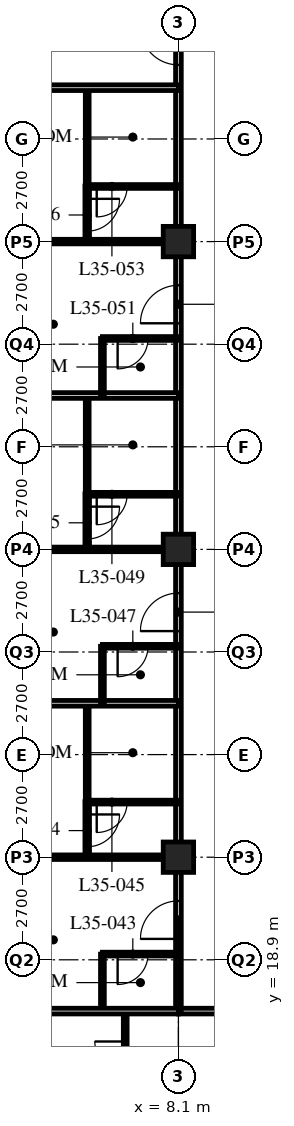
"""IFC4 building model, lengths in metres.
Left out: names, types, materials, properties, quantities, classifications, styles, units other than length and angle.
Written with IfcOpenShell. Run it as: python <this file> out.ifc"""

import sys

from ifc_helpers import new_model, si_unit, direction, frame, frame_2d, origin, origin_2d, place, context, subcontext, project, spatial, rectangle, hollow_rectangle, extrude, element, fill, save


model = new_model("IFC4")
c1 = context("Model", 3, precision=1e-05, world=origin(), true_north=direction((0.0, 1.0)))
c2 = subcontext(c1, "Body", "Model", "MODEL_VIEW")
j1 = project(units=[si_unit("LENGTHUNIT", "METRE"), si_unit("PLANEANGLEUNIT", "RADIAN")], contexts=[c1])
p1 = place(None, origin())
s1 = spatial("IfcSite", under=j1, at=p1, CompositionType="ELEMENT")
p2 = place(p1, origin())
s2 = spatial("IfcBuilding", under=s1, at=p2, CompositionType="ELEMENT")
p3 = place(p2, frame((0.0, 0.0, 137.4)))
s3 = spatial("IfcBuildingStorey", under=s2, at=p3, CompositionType="ELEMENT", Elevation=137.4)
for number, where, z_axis, x_axis in (
    (1, (8.1, 21.6, 0.0), (0.0, 0.0, 1.0), (1.0, 0.0, 0.0)),
    (2, (8.1, 29.7, 0.0), (0.0, 0.0, 1.0), (1.0, 0.0, 0.0)),
    (3, (8.1, 37.8, 0.0), (0.0, 0.0, 1.0), (1.0, 0.0, 0.0)),
):
    element("IfcColumn", number, at=place(p3, frame(where, z_axis=z_axis, x_axis=x_axis)), inside=s3, PredefinedType="COLUMN", context=c2, shape_type="SweptSolid", body=[
        extrude(hollow_rectangle(XDim=0.8, YDim=0.8, WallThickness=0.08, at=origin_2d()), origin(), (0.0, 0.0, 1.0), 3.4),
    ])
p4 = place(p3, frame((8.1, 17.55, 0.0), z_axis=(0.0, 0.0, 1.0), x_axis=(1.0, 0.0, 0.0)))
e4 = element("IfcWall", 4, at=p4, inside=s3, PredefinedType="PARTITIONING", context=c2, shape_type="SweptSolid", body=[
    extrude(rectangle(XDim=36.45, YDim=0.15, at=frame_2d((18.225, 0.0))), origin(), (0.0, 0.0, 1.0), 3.19),
])
p5 = place(p4, frame((9.625, 0.0, 0.0)))
e5 = element("IfcOpeningElement", 5, at=p5, cuts=e4, PredefinedType="OPENING", context=c2, shape_type="SweptSolid", body=[
    extrude(rectangle(XDim=1.0, YDim=2.1, at=frame_2d((0.5, 1.05))), frame((0.0, 0.085, 0.0), z_axis=(0.0, -1.0, 0.0), x_axis=(1.0, 0.0, 0.0)), (0.0, 0.0, 1.0), 0.17),
])
p6 = place(p4, frame((18.1, 0.0, 0.0)))
e6 = element("IfcOpeningElement", 6, at=p6, cuts=e4, PredefinedType="OPENING", context=c2, shape_type="SweptSolid", body=[
    extrude(rectangle(XDim=1.0, YDim=2.1, at=frame_2d((0.5, 1.05))), frame((0.0, 0.085, 0.0), z_axis=(0.0, -1.0, 0.0), x_axis=(1.0, 0.0, 0.0)), (0.0, 0.0, 1.0), 0.17),
])
p7 = place(p4, frame((26.75, 0.0, 0.0)))
e7 = element("IfcOpeningElement", 7, at=p7, cuts=e4, PredefinedType="OPENING", context=c2, shape_type="SweptSolid", body=[
    extrude(rectangle(XDim=1.0, YDim=2.1, at=frame_2d((0.5, 1.05))), frame((0.0, 0.085, 0.0), z_axis=(0.0, -1.0, 0.0), x_axis=(1.0, 0.0, 0.0)), (0.0, 0.0, 1.0), 0.17),
])
p8 = place(p4, frame((30.8, 0.0, 0.0)))
e8 = element("IfcOpeningElement", 8, at=p8, cuts=e4, PredefinedType="OPENING", context=c2, shape_type="SweptSolid", body=[
    extrude(rectangle(XDim=1.0, YDim=2.1, at=frame_2d((0.5, 1.05))), frame((0.0, 0.085, 0.0), z_axis=(0.0, -1.0, 0.0), x_axis=(1.0, 0.0, 0.0)), (0.0, 0.0, 1.0), 0.17),
])
p9 = place(p4, frame((1.525, 0.0, 0.0)))
e9 = element("IfcOpeningElement", 9, at=p9, cuts=e4, PredefinedType="OPENING", context=c2, shape_type="SweptSolid", body=[
    extrude(rectangle(XDim=1.0, YDim=2.1, at=frame_2d((0.5, 1.05))), frame((0.0, 0.085, 0.0), z_axis=(0.0, -1.0, 0.0), x_axis=(1.0, 0.0, 0.0)), (0.0, 0.0, 1.0), 0.17),
])
p10 = place(p4, frame((33.925, 0.0, 0.0)))
e10 = element("IfcOpeningElement", 10, at=p10, cuts=e4, PredefinedType="OPENING", context=c2, shape_type="SweptSolid", body=[
    extrude(rectangle(XDim=1.0, YDim=2.1, at=frame_2d((0.5, 1.05))), frame((0.0, 0.085, 0.0), z_axis=(0.0, -1.0, 0.0), x_axis=(1.0, 0.0, 0.0)), (0.0, 0.0, 1.0), 0.17),
])
p11 = place(p3, frame((8.1, 17.55, 0.0), z_axis=(0.0, 0.0, 1.0), x_axis=(0.0, 1.0, 0.0)))
e11 = element("IfcWall", 11, at=p11, inside=s3, PredefinedType="PARTITIONING", context=c2, shape_type="SweptSolid", body=[
    extrude(rectangle(XDim=28.35, YDim=0.15, at=frame_2d((14.175, 0.0))), origin(), (0.0, 0.0, 1.0), 2.578),
])
p12 = place(p11, frame((1.9, 0.0, 0.0)))
e12 = element("IfcOpeningElement", 12, at=p12, cuts=e11, PredefinedType="OPENING", context=c2, shape_type="SweptSolid", body=[
    extrude(rectangle(XDim=1.0, YDim=2.1, at=frame_2d((0.5, 1.05))), frame((0.0, 0.085, 0.0), z_axis=(0.0, -1.0, 0.0), x_axis=(1.0, 0.0, 0.0)), (0.0, 0.0, 1.0), 0.17),
])
p13 = place(p11, frame((10.0, 0.0, 0.0)))
e13 = element("IfcOpeningElement", 13, at=p13, cuts=e11, PredefinedType="OPENING", context=c2, shape_type="SweptSolid", body=[
    extrude(rectangle(XDim=1.0, YDim=2.1, at=frame_2d((0.5, 1.05))), frame((0.0, 0.085, 0.0), z_axis=(0.0, -1.0, 0.0), x_axis=(1.0, 0.0, 0.0)), (0.0, 0.0, 1.0), 0.17),
])
p14 = place(p11, frame((18.1, 0.0, 0.0)))
e14 = element("IfcOpeningElement", 14, at=p14, cuts=e11, PredefinedType="OPENING", context=c2, shape_type="SweptSolid", body=[
    extrude(rectangle(XDim=1.0, YDim=2.1, at=frame_2d((0.5, 1.05))), frame((0.0, 0.085, 0.0), z_axis=(0.0, -1.0, 0.0), x_axis=(1.0, 0.0, 0.0)), (0.0, 0.0, 1.0), 0.17),
])
p15 = place(p11, frame((24.9, 0.0, 0.0)))
e15 = element("IfcOpeningElement", 15, at=p15, cuts=e11, PredefinedType="OPENING", context=c2, shape_type="SweptSolid", body=[
    extrude(rectangle(XDim=1.0, YDim=2.1, at=frame_2d((0.5, 1.05))), frame((0.0, 0.085, 0.0), z_axis=(0.0, -1.0, 0.0), x_axis=(1.0, 0.0, 0.0)), (0.0, 0.0, 1.0), 0.17),
])
p16 = place(p3, frame((6.1, 17.55, 0.0), z_axis=(0.0, 0.0, 1.0), x_axis=(0.0, 1.0, 0.0)))
e16 = element("IfcWall", 16, at=p16, inside=s3, PredefinedType="PARTITIONING", context=c2, shape_type="SweptSolid", body=[
    extrude(rectangle(XDim=1.5, YDim=0.1, at=frame_2d((0.75, 0.0))), origin(), (0.0, 0.0, 1.0), 3.19),
])
p17 = place(p3, frame((8.1, 19.05, 0.0), z_axis=(0.0, 0.0, 1.0), x_axis=(-1.0, 0.0, 0.0)))
e17 = element("IfcWall", 17, at=p17, inside=s3, PredefinedType="PARTITIONING", context=c2, shape_type="SweptSolid", body=[
    extrude(rectangle(XDim=2.0, YDim=0.1, at=frame_2d((1.0, 0.0))), origin(), (0.0, 0.0, 1.0), 3.19),
])
p18 = place(p17, frame((0.8, 0.0, 0.0)))
e18 = element("IfcOpeningElement", 18, at=p18, cuts=e17, PredefinedType="OPENING", context=c2, shape_type="SweptSolid", body=[
    extrude(rectangle(XDim=0.8, YDim=2.1, at=frame_2d((0.4, 1.05))), frame((0.0, 0.06, 0.0), z_axis=(0.0, -1.0, 0.0), x_axis=(1.0, 0.0, 0.0)), (0.0, 0.0, 1.0), 0.12),
])
p19 = place(p3, frame((5.7, 23.05, 0.0), z_axis=(0.0, 0.0, 1.0), x_axis=(0.0, 1.0, 0.0)))
e19 = element("IfcWall", 19, at=p19, inside=s3, PredefinedType="PARTITIONING", context=c2, shape_type="SweptSolid", body=[
    extrude(rectangle(XDim=2.6, YDim=0.1, at=frame_2d((1.3, 0.0))), origin(), (0.0, 0.0, 1.0), 3.19),
])
p20 = place(p3, frame((8.1, 23.05, 0.0), z_axis=(0.0, 0.0, 1.0), x_axis=(-1.0, 0.0, 0.0)))
e20 = element("IfcWall", 20, at=p20, inside=s3, PredefinedType="PARTITIONING", context=c2, shape_type="SweptSolid", body=[
    extrude(rectangle(XDim=2.4, YDim=0.1, at=frame_2d((1.2, 0.0))), origin(), (0.0, 0.0, 1.0), 3.19),
])
p21 = place(p20, frame((1.35, 0.0, 0.0)))
e21 = element("IfcOpeningElement", 21, at=p21, cuts=e20, PredefinedType="OPENING", context=c2, shape_type="SweptSolid", body=[
    extrude(rectangle(XDim=0.8, YDim=2.1, at=frame_2d((0.4, 1.05))), frame((0.0, 0.06, 0.0), z_axis=(0.0, -1.0, 0.0), x_axis=(1.0, 0.0, 0.0)), (0.0, 0.0, 1.0), 0.12),
])
p22 = place(p3, frame((8.1, 21.6, 0.0), z_axis=(0.0, 0.0, 1.0), x_axis=(-1.0, 0.0, 0.0)))
e22 = element("IfcWall", 22, at=p22, inside=s3, PredefinedType="PARTITIONING", context=c2, shape_type="SweptSolid", body=[
    extrude(rectangle(XDim=7.8, YDim=0.12, at=frame_2d((3.9, 0.0))), origin(), (0.0, 0.0, 1.0), 2.578),
])
p23 = place(p22, frame((4.825, 0.0, 0.0)))
e23 = element("IfcOpeningElement", 23, at=p23, cuts=e22, PredefinedType="OPENING", context=c2, shape_type="SweptSolid", body=[
    extrude(rectangle(XDim=0.85, YDim=2.1, at=frame_2d((0.425, 1.05))), frame((0.0, 0.07, 0.0), z_axis=(0.0, -1.0, 0.0), x_axis=(1.0, 0.0, 0.0)), (0.0, 0.0, 1.0), 0.14),
])
p24 = place(p3, frame((8.1, 25.65, 0.0), z_axis=(0.0, 0.0, 1.0), x_axis=(-1.0, 0.0, 0.0)))
e24 = element("IfcWall", 24, at=p24, inside=s3, PredefinedType="PARTITIONING", context=c2, shape_type="SweptSolid", body=[
    extrude(rectangle(XDim=7.8, YDim=0.15, at=frame_2d((3.9, 0.0))), origin(), (0.0, 0.0, 1.0), 3.19),
])
p25 = place(p3, frame((6.1, 25.65, 0.0), z_axis=(0.0, 0.0, 1.0), x_axis=(0.0, 1.0, 0.0)))
e25 = element("IfcWall", 25, at=p25, inside=s3, PredefinedType="PARTITIONING", context=c2, shape_type="SweptSolid", body=[
    extrude(rectangle(XDim=1.5, YDim=0.1, at=frame_2d((0.75, 0.0))), origin(), (0.0, 0.0, 1.0), 3.19),
])
p26 = place(p3, frame((8.1, 27.15, 0.0), z_axis=(0.0, 0.0, 1.0), x_axis=(-1.0, 0.0, 0.0)))
e26 = element("IfcWall", 26, at=p26, inside=s3, PredefinedType="PARTITIONING", context=c2, shape_type="SweptSolid", body=[
    extrude(rectangle(XDim=2.0, YDim=0.1, at=frame_2d((1.0, 0.0))), origin(), (0.0, 0.0, 1.0), 3.19),
])
p27 = place(p26, frame((0.8, 0.0, 0.0)))
e27 = element("IfcOpeningElement", 27, at=p27, cuts=e26, PredefinedType="OPENING", context=c2, shape_type="SweptSolid", body=[
    extrude(rectangle(XDim=0.8, YDim=2.1, at=frame_2d((0.4, 1.05))), frame((0.0, 0.06, 0.0), z_axis=(0.0, -1.0, 0.0), x_axis=(1.0, 0.0, 0.0)), (0.0, 0.0, 1.0), 0.12),
])
p28 = place(p3, frame((5.7, 31.15, 0.0), z_axis=(0.0, 0.0, 1.0), x_axis=(0.0, 1.0, 0.0)))
e28 = element("IfcWall", 28, at=p28, inside=s3, PredefinedType="PARTITIONING", context=c2, shape_type="SweptSolid", body=[
    extrude(rectangle(XDim=2.6, YDim=0.1, at=frame_2d((1.3, 0.0))), origin(), (0.0, 0.0, 1.0), 3.19),
])
p29 = place(p3, frame((8.1, 31.15, 0.0), z_axis=(0.0, 0.0, 1.0), x_axis=(-1.0, 0.0, 0.0)))
e29 = element("IfcWall", 29, at=p29, inside=s3, PredefinedType="PARTITIONING", context=c2, shape_type="SweptSolid", body=[
    extrude(rectangle(XDim=2.4, YDim=0.1, at=frame_2d((1.2, 0.0))), origin(), (0.0, 0.0, 1.0), 3.19),
])
p30 = place(p29, frame((1.35, 0.0, 0.0)))
e30 = element("IfcOpeningElement", 30, at=p30, cuts=e29, PredefinedType="OPENING", context=c2, shape_type="SweptSolid", body=[
    extrude(rectangle(XDim=0.8, YDim=2.1, at=frame_2d((0.4, 1.05))), frame((0.0, 0.06, 0.0), z_axis=(0.0, -1.0, 0.0), x_axis=(1.0, 0.0, 0.0)), (0.0, 0.0, 1.0), 0.12),
])
p31 = place(p3, frame((8.1, 29.7, 0.0), z_axis=(0.0, 0.0, 1.0), x_axis=(-1.0, 0.0, 0.0)))
e31 = element("IfcWall", 31, at=p31, inside=s3, PredefinedType="PARTITIONING", context=c2, shape_type="SweptSolid", body=[
    extrude(rectangle(XDim=7.8, YDim=0.12, at=frame_2d((3.9, 0.0))), origin(), (0.0, 0.0, 1.0), 2.578),
])
p32 = place(p31, frame((4.825, 0.0, 0.0)))
e32 = element("IfcOpeningElement", 32, at=p32, cuts=e31, PredefinedType="OPENING", context=c2, shape_type="SweptSolid", body=[
    extrude(rectangle(XDim=0.85, YDim=2.1, at=frame_2d((0.425, 1.05))), frame((0.0, 0.07, 0.0), z_axis=(0.0, -1.0, 0.0), x_axis=(1.0, 0.0, 0.0)), (0.0, 0.0, 1.0), 0.14),
])
p33 = place(p3, frame((8.1, 33.75, 0.0), z_axis=(0.0, 0.0, 1.0), x_axis=(-1.0, 0.0, 0.0)))
e33 = element("IfcWall", 33, at=p33, inside=s3, PredefinedType="PARTITIONING", context=c2, shape_type="SweptSolid", body=[
    extrude(rectangle(XDim=7.8, YDim=0.15, at=frame_2d((3.9, 0.0))), origin(), (0.0, 0.0, 1.0), 3.19),
])
p34 = place(p3, frame((6.1, 33.75, 0.0), z_axis=(0.0, 0.0, 1.0), x_axis=(0.0, 1.0, 0.0)))
e34 = element("IfcWall", 34, at=p34, inside=s3, PredefinedType="PARTITIONING", context=c2, shape_type="SweptSolid", body=[
    extrude(rectangle(XDim=1.5, YDim=0.1, at=frame_2d((0.75, 0.0))), origin(), (0.0, 0.0, 1.0), 3.19),
])
p35 = place(p3, frame((8.1, 35.25, 0.0), z_axis=(0.0, 0.0, 1.0), x_axis=(-1.0, 0.0, 0.0)))
e35 = element("IfcWall", 35, at=p35, inside=s3, PredefinedType="PARTITIONING", context=c2, shape_type="SweptSolid", body=[
    extrude(rectangle(XDim=2.0, YDim=0.1, at=frame_2d((1.0, 0.0))), origin(), (0.0, 0.0, 1.0), 3.19),
])
p36 = place(p35, frame((0.8, 0.0, 0.0)))
e36 = element("IfcOpeningElement", 36, at=p36, cuts=e35, PredefinedType="OPENING", context=c2, shape_type="SweptSolid", body=[
    extrude(rectangle(XDim=0.8, YDim=2.1, at=frame_2d((0.4, 1.05))), frame((0.0, 0.06, 0.0), z_axis=(0.0, -1.0, 0.0), x_axis=(1.0, 0.0, 0.0)), (0.0, 0.0, 1.0), 0.12),
])
p37 = place(p3, frame((5.7, 39.25, 0.0), z_axis=(0.0, 0.0, 1.0), x_axis=(0.0, 1.0, 0.0)))
e37 = element("IfcWall", 37, at=p37, inside=s3, PredefinedType="PARTITIONING", context=c2, shape_type="SweptSolid", body=[
    extrude(rectangle(XDim=2.6, YDim=0.1, at=frame_2d((1.3, 0.0))), origin(), (0.0, 0.0, 1.0), 3.19),
])
p38 = place(p3, frame((8.1, 39.25, 0.0), z_axis=(0.0, 0.0, 1.0), x_axis=(-1.0, 0.0, 0.0)))
e38 = element("IfcWall", 38, at=p38, inside=s3, PredefinedType="PARTITIONING", context=c2, shape_type="SweptSolid", body=[
    extrude(rectangle(XDim=2.4, YDim=0.1, at=frame_2d((1.2, 0.0))), origin(), (0.0, 0.0, 1.0), 3.19),
])
p39 = place(p38, frame((1.35, 0.0, 0.0)))
e39 = element("IfcOpeningElement", 39, at=p39, cuts=e38, PredefinedType="OPENING", context=c2, shape_type="SweptSolid", body=[
    extrude(rectangle(XDim=0.8, YDim=2.1, at=frame_2d((0.4, 1.05))), frame((0.0, 0.06, 0.0), z_axis=(0.0, -1.0, 0.0), x_axis=(1.0, 0.0, 0.0)), (0.0, 0.0, 1.0), 0.12),
])
p40 = place(p3, frame((8.1, 37.8, 0.0), z_axis=(0.0, 0.0, 1.0), x_axis=(-1.0, 0.0, 0.0)))
e40 = element("IfcWall", 40, at=p40, inside=s3, PredefinedType="PARTITIONING", context=c2, shape_type="SweptSolid", body=[
    extrude(rectangle(XDim=7.8, YDim=0.12, at=frame_2d((3.9, 0.0))), origin(), (0.0, 0.0, 1.0), 2.578),
])
p41 = place(p40, frame((4.825, 0.0, 0.0)))
e41 = element("IfcOpeningElement", 41, at=p41, cuts=e40, PredefinedType="OPENING", context=c2, shape_type="SweptSolid", body=[
    extrude(rectangle(XDim=0.85, YDim=2.1, at=frame_2d((0.425, 1.05))), frame((0.0, 0.07, 0.0), z_axis=(0.0, -1.0, 0.0), x_axis=(1.0, 0.0, 0.0)), (0.0, 0.0, 1.0), 0.14),
])
p42 = place(p3, frame((8.1, 41.85, 0.0), z_axis=(0.0, 0.0, 1.0), x_axis=(-1.0, 0.0, 0.0)))
e42 = element("IfcWall", 42, at=p42, inside=s3, PredefinedType="PARTITIONING", context=c2, shape_type="SweptSolid", body=[
    extrude(rectangle(XDim=7.8, YDim=0.15, at=frame_2d((3.9, 0.0))), origin(), (0.0, 0.0, 1.0), 3.19),
])
p43 = place(p3, frame((6.7, 17.55, 0.0), z_axis=(0.0, 0.0, 1.0), x_axis=(0.0, -1.0, 0.0)))
e43 = element("IfcWall", 43, at=p43, inside=s3, PredefinedType="PARTITIONING", context=c2, shape_type="SweptSolid", body=[
    extrude(rectangle(XDim=2.4, YDim=0.1, at=frame_2d((1.2, 0.0))), origin(), (0.0, 0.0, 1.0), 3.19),
])
p44 = place(p43, frame((0.8, 0.0, 0.0)))
e44 = element("IfcOpeningElement", 44, at=p44, cuts=e43, PredefinedType="OPENING", context=c2, shape_type="SweptSolid", body=[
    extrude(rectangle(XDim=0.8, YDim=2.1, at=frame_2d((0.4, 1.05))), frame((0.0, 0.06, 0.0), z_axis=(0.0, -1.0, 0.0), x_axis=(1.0, 0.0, 0.0)), (0.0, 0.0, 1.0), 0.12),
])
p45 = place(p3, frame((0.3, 17.55, 0.0), z_axis=(0.0, 0.0, 1.0), x_axis=(1.0, 0.0, 0.0)))
e45 = element("IfcWall", 45, at=p45, inside=s3, PredefinedType="PARTITIONING", context=c2, shape_type="SweptSolid", body=[
    extrude(rectangle(XDim=7.8, YDim=0.15, at=frame_2d((3.9, 0.0))), origin(), (0.0, 0.0, 1.0), 3.19),
])
p46 = place(p3, frame((5.7, 21.6, 0.0), z_axis=(0.0, 0.0, 1.0), x_axis=(0.0, 1.0, 0.0)))
e46 = element("IfcWall", 46, at=p46, inside=s3, PredefinedType="PARTITIONING", context=c2, shape_type="SweptSolid", body=[
    extrude(rectangle(XDim=1.46, YDim=0.12, at=frame_2d((0.73, 0.0))), origin(), (0.0, 0.0, 1.0), 3.19),
])
p47 = place(p46, frame((0.275, 0.0, 0.0)))
e47 = element("IfcOpeningElement", 47, at=p47, cuts=e46, PredefinedType="OPENING", context=c2, shape_type="SweptSolid", body=[
    extrude(rectangle(XDim=0.85, YDim=2.1, at=frame_2d((0.425, 1.05))), frame((0.0, 0.07, 0.0), z_axis=(0.0, -1.0, 0.0), x_axis=(1.0, 0.0, 0.0)), (0.0, 0.0, 1.0), 0.14),
])
p48 = place(p3, frame((5.7, 29.7, 0.0), z_axis=(0.0, 0.0, 1.0), x_axis=(0.0, 1.0, 0.0)))
e48 = element("IfcWall", 48, at=p48, inside=s3, PredefinedType="PARTITIONING", context=c2, shape_type="SweptSolid", body=[
    extrude(rectangle(XDim=1.46, YDim=0.12, at=frame_2d((0.73, 0.0))), origin(), (0.0, 0.0, 1.0), 3.19),
])
p49 = place(p48, frame((0.275, 0.0, 0.0)))
e49 = element("IfcOpeningElement", 49, at=p49, cuts=e48, PredefinedType="OPENING", context=c2, shape_type="SweptSolid", body=[
    extrude(rectangle(XDim=0.85, YDim=2.1, at=frame_2d((0.425, 1.05))), frame((0.0, 0.07, 0.0), z_axis=(0.0, -1.0, 0.0), x_axis=(1.0, 0.0, 0.0)), (0.0, 0.0, 1.0), 0.14),
])
p50 = place(p3, frame((5.7, 37.8, 0.0), z_axis=(0.0, 0.0, 1.0), x_axis=(0.0, 1.0, 0.0)))
e50 = element("IfcWall", 50, at=p50, inside=s3, PredefinedType="PARTITIONING", context=c2, shape_type="SweptSolid", body=[
    extrude(rectangle(XDim=1.46, YDim=0.12, at=frame_2d((0.73, 0.0))), origin(), (0.0, 0.0, 1.0), 3.19),
])
p51 = place(p50, frame((0.275, 0.0, 0.0)))
e51 = element("IfcOpeningElement", 51, at=p51, cuts=e50, PredefinedType="OPENING", context=c2, shape_type="SweptSolid", body=[
    extrude(rectangle(XDim=0.85, YDim=2.1, at=frame_2d((0.425, 1.05))), frame((0.0, 0.07, 0.0), z_axis=(0.0, -1.0, 0.0), x_axis=(1.0, 0.0, 0.0)), (0.0, 0.0, 1.0), 0.14),
])
p52 = place(p18, origin())
e52 = element("IfcDoor", 52, at=p52, inside=s3, OperationType="SINGLE_SWING_RIGHT", PredefinedType="DOOR", context=c2, shape_type="SweptSolid", body=[
    extrude(rectangle(XDim=0.8, YDim=2.1, at=frame_2d((0.4, 1.05))), frame((0.0, 0.025, 0.0), z_axis=(0.0, -1.0, 0.0), x_axis=(1.0, 0.0, 0.0)), (0.0, 0.0, 1.0), 0.05),
])
fill(e18, e52)
p53 = place(p12, origin())
e53 = element("IfcDoor", 53, at=p53, inside=s3, OperationType="SINGLE_SWING_LEFT", PredefinedType="DOOR", context=c2, shape_type="SweptSolid", body=[
    extrude(rectangle(XDim=1.0, YDim=2.1, at=frame_2d((0.5, 1.05))), frame((0.0, 0.025, 0.0), z_axis=(0.0, -1.0, 0.0), x_axis=(1.0, 0.0, 0.0)), (0.0, 0.0, 1.0), 0.05),
])
fill(e12, e53)
p54 = place(p21, origin())
e54 = element("IfcDoor", 54, at=p54, inside=s3, OperationType="SINGLE_SWING_RIGHT", PredefinedType="DOOR", context=c2, shape_type="SweptSolid", body=[
    extrude(rectangle(XDim=0.8, YDim=2.1, at=frame_2d((0.4, 1.05))), frame((0.0, 0.025, 0.0), z_axis=(0.0, -1.0, 0.0), x_axis=(1.0, 0.0, 0.0)), (0.0, 0.0, 1.0), 0.05),
])
fill(e21, e54)
p55 = place(p27, origin())
e55 = element("IfcDoor", 55, at=p55, inside=s3, OperationType="SINGLE_SWING_RIGHT", PredefinedType="DOOR", context=c2, shape_type="SweptSolid", body=[
    extrude(rectangle(XDim=0.8, YDim=2.1, at=frame_2d((0.4, 1.05))), frame((0.0, 0.025, 0.0), z_axis=(0.0, -1.0, 0.0), x_axis=(1.0, 0.0, 0.0)), (0.0, 0.0, 1.0), 0.05),
])
fill(e27, e55)
p56 = place(p13, origin())
e56 = element("IfcDoor", 56, at=p56, inside=s3, OperationType="SINGLE_SWING_LEFT", PredefinedType="DOOR", context=c2, shape_type="SweptSolid", body=[
    extrude(rectangle(XDim=1.0, YDim=2.1, at=frame_2d((0.5, 1.05))), frame((0.0, 0.025, 0.0), z_axis=(0.0, -1.0, 0.0), x_axis=(1.0, 0.0, 0.0)), (0.0, 0.0, 1.0), 0.05),
])
fill(e13, e56)
p57 = place(p30, origin())
e57 = element("IfcDoor", 57, at=p57, inside=s3, OperationType="SINGLE_SWING_RIGHT", PredefinedType="DOOR", context=c2, shape_type="SweptSolid", body=[
    extrude(rectangle(XDim=0.8, YDim=2.1, at=frame_2d((0.4, 1.05))), frame((0.0, 0.025, 0.0), z_axis=(0.0, -1.0, 0.0), x_axis=(1.0, 0.0, 0.0)), (0.0, 0.0, 1.0), 0.05),
])
fill(e30, e57)
p58 = place(p36, origin())
e58 = element("IfcDoor", 58, at=p58, inside=s3, OperationType="SINGLE_SWING_RIGHT", PredefinedType="DOOR", context=c2, shape_type="SweptSolid", body=[
    extrude(rectangle(XDim=0.8, YDim=2.1, at=frame_2d((0.4, 1.05))), frame((0.0, 0.025, 0.0), z_axis=(0.0, -1.0, 0.0), x_axis=(1.0, 0.0, 0.0)), (0.0, 0.0, 1.0), 0.05),
])
fill(e36, e58)
p59 = place(p14, origin())
e59 = element("IfcDoor", 59, at=p59, inside=s3, OperationType="SINGLE_SWING_LEFT", PredefinedType="DOOR", context=c2, shape_type="SweptSolid", body=[
    extrude(rectangle(XDim=1.0, YDim=2.1, at=frame_2d((0.5, 1.05))), frame((0.0, 0.025, 0.0), z_axis=(0.0, -1.0, 0.0), x_axis=(1.0, 0.0, 0.0)), (0.0, 0.0, 1.0), 0.05),
])
fill(e14, e59)
p60 = place(p39, origin())
e60 = element("IfcDoor", 60, at=p60, inside=s3, OperationType="SINGLE_SWING_RIGHT", PredefinedType="DOOR", context=c2, shape_type="SweptSolid", body=[
    extrude(rectangle(XDim=0.8, YDim=2.1, at=frame_2d((0.4, 1.05))), frame((0.0, 0.025, 0.0), z_axis=(0.0, -1.0, 0.0), x_axis=(1.0, 0.0, 0.0)), (0.0, 0.0, 1.0), 0.05),
])
fill(e39, e60)
p61 = place(p15, origin())
e61 = element("IfcDoor", 61, at=p61, inside=s3, OperationType="SINGLE_SWING_RIGHT", PredefinedType="DOOR", context=c2, shape_type="SweptSolid", body=[
    extrude(rectangle(XDim=1.0, YDim=2.1, at=frame_2d((0.5, 1.05))), frame((0.0, 0.025, 0.0), z_axis=(0.0, -1.0, 0.0), x_axis=(1.0, 0.0, 0.0)), (0.0, 0.0, 1.0), 0.05),
])
fill(e15, e61)
p62 = place(p44, origin())
e62 = element("IfcDoor", 62, at=p62, inside=s3, OperationType="SINGLE_SWING_RIGHT", PredefinedType="DOOR", context=c2, shape_type="SweptSolid", body=[
    extrude(rectangle(XDim=0.8, YDim=2.1, at=frame_2d((0.4, 1.05))), frame((0.0, 0.025, 0.0), z_axis=(0.0, -1.0, 0.0), x_axis=(1.0, 0.0, 0.0)), (0.0, 0.0, 1.0), 0.05),
])
fill(e44, e62)
p63 = place(p47, origin())
e63 = element("IfcDoor", 63, at=p63, inside=s3, OperationType="SINGLE_SWING_LEFT", PredefinedType="DOOR", context=c2, shape_type="SweptSolid", body=[
    extrude(rectangle(XDim=0.85, YDim=2.1, at=frame_2d((0.425, 1.05))), frame((0.0, 0.025, 0.0), z_axis=(0.0, -1.0, 0.0), x_axis=(1.0, 0.0, 0.0)), (0.0, 0.0, 1.0), 0.05),
])
fill(e47, e63)
p64 = place(p49, origin())
e64 = element("IfcDoor", 64, at=p64, inside=s3, OperationType="SINGLE_SWING_LEFT", PredefinedType="DOOR", context=c2, shape_type="SweptSolid", body=[
    extrude(rectangle(XDim=0.85, YDim=2.1, at=frame_2d((0.425, 1.05))), frame((0.0, 0.025, 0.0), z_axis=(0.0, -1.0, 0.0), x_axis=(1.0, 0.0, 0.0)), (0.0, 0.0, 1.0), 0.05),
])
fill(e49, e64)
p65 = place(p51, origin())
e65 = element("IfcDoor", 65, at=p65, inside=s3, OperationType="SINGLE_SWING_LEFT", PredefinedType="DOOR", context=c2, shape_type="SweptSolid", body=[
    extrude(rectangle(XDim=0.85, YDim=2.1, at=frame_2d((0.425, 1.05))), frame((0.0, 0.025, 0.0), z_axis=(0.0, -1.0, 0.0), x_axis=(1.0, 0.0, 0.0)), (0.0, 0.0, 1.0), 0.05),
])
fill(e51, e65)
save(model, sys.argv[1])
